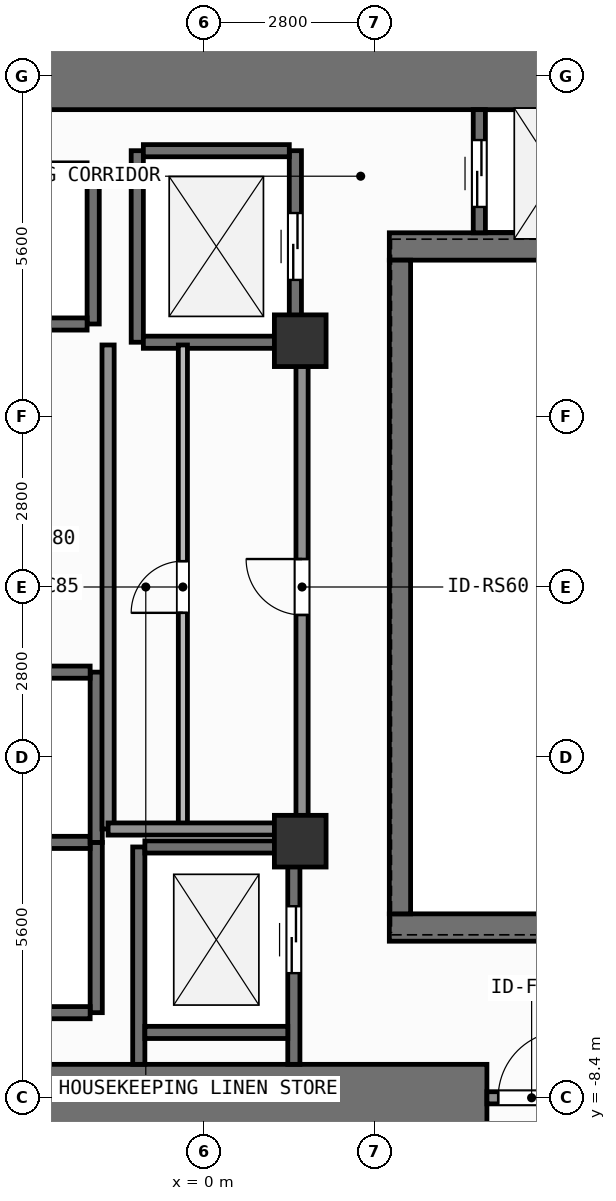
"""IFC4 building model, lengths in metres.
Left out: names, types, materials, properties, quantities, classifications, styles, units other than length and angle.
Written with IfcOpenShell. Run it as: python <this file> out.ifc"""

import sys

from ifc_helpers import new_model, si_unit, direction, frame, frame_2d, origin, origin_2d, place, context, subcontext, project, spatial, rectangle, extrude, element, fill, save


model = new_model("IFC4")
c1 = context("Model", 3, precision=1e-05, world=origin(), true_north=direction((0.0, 1.0)))
c2 = subcontext(c1, "Body", "Model", "MODEL_VIEW")
j1 = project(units=[si_unit("LENGTHUNIT", "METRE"), si_unit("PLANEANGLEUNIT", "RADIAN")], contexts=[c1])
p1 = place(None, origin())
s1 = spatial("IfcSite", under=j1, at=p1, CompositionType="ELEMENT")
p2 = place(p1, origin())
s2 = spatial("IfcBuilding", under=s1, at=p2, CompositionType="ELEMENT")
p3 = place(p2, frame((0.0, 0.0, 54.0)))
s3 = spatial("IfcBuildingStorey", under=s2, at=p3, CompositionType="ELEMENT", Elevation=54.0)
p4 = place(p3, frame((-2.62, -8.4, 0.0), z_axis=(0.0, 0.0, 1.0), x_axis=(1.0, 0.0, 0.0)))
e1 = element("IfcWall", 1, at=p4, inside=s3, PredefinedType="SHEAR", context=c2, shape_type="SweptSolid", body=[
    extrude(rectangle(XDim=7.27, YDim=1.1, at=frame_2d((3.635, 0.0))), origin(), (0.0, 0.0, 1.0), 3.9),
])
p5 = place(p3, frame((-7.55, 8.4, 0.0), z_axis=(0.0, 0.0, 1.0), x_axis=(1.0, 0.0, 0.0)))
e2 = element("IfcWall", 2, at=p5, inside=s3, PredefinedType="SHEAR", context=c2, shape_type="SweptSolid", body=[
    extrude(rectangle(XDim=16.5, YDim=1.1, at=frame_2d((8.25, 0.0))), origin(), (0.0, 0.0, 1.0), 3.9),
])
for number, where, z_axis, x_axis in (
    (3, (3.045, -5.6, 0.0), (0.0, 0.0, 1.0), (1.0, 0.0, 0.0)),
    (4, (3.045, 5.6, 0.0), (0.0, 0.0, 1.0), (1.0, 0.0, 0.0)),
):
    element("IfcWall", number, at=place(p3, frame(where, z_axis=z_axis, x_axis=x_axis)), inside=s3, PredefinedType="SHEAR", context=c2, shape_type="SweptSolid", body=[
        extrude(rectangle(XDim=5.905, YDim=0.45, at=frame_2d((2.953, 0.0))), origin(), (0.0, 0.0, 1.0), 3.9),
    ])
p6 = place(p3, frame((3.22, -5.375, 0.0), z_axis=(0.0, 0.0, 1.0), x_axis=(0.0, 1.0, 0.0)))
e5 = element("IfcWall", 5, at=p6, inside=s3, PredefinedType="SHEAR", context=c2, shape_type="SweptSolid", body=[
    extrude(rectangle(XDim=10.75, YDim=0.35, at=frame_2d((5.375, 0.0))), origin(), (0.0, 0.0, 1.0), 3.9),
])
for number, where, z_axis, x_axis in (
    (6, (1.58, -4.18, 0.0), (0.0, 0.0, 1.0), (1.0, 0.0, 0.0)),
    (7, (1.58, 4.05, 0.0), (0.0, 0.0, 1.0), (1.0, 0.0, 0.0)),
):
    element("IfcColumn", number, at=place(p3, frame(where, z_axis=z_axis, x_axis=x_axis)), inside=s3, PredefinedType="COLUMN", context=c2, shape_type="SweptSolid", body=[
        extrude(rectangle(XDim=0.85, YDim=0.85, at=origin_2d()), origin(), (0.0, 0.0, 1.0), 3.9),
    ])
p7 = place(p3, frame((-1.825, 4.325, 0.0), z_axis=(0.0, 0.0, 1.0), x_axis=(0.0, 1.0, 0.0)))
e8 = element("IfcWall", 8, at=p7, inside=s3, PredefinedType="SHEAR", context=c2, shape_type="SweptSolid", body=[
    extrude(rectangle(XDim=2.55, YDim=0.2, at=frame_2d((1.275, 0.0))), origin(), (0.0, 0.0, 1.0), 3.68),
])
for number, where, z_axis, x_axis in (
    (9, (-4.275, 4.325, 0.0), (0.0, 0.0, 1.0), (1.0, 0.0, 0.0)),
    (10, (-4.275, 6.875, 0.0), (0.0, 0.0, 1.0), (1.0, 0.0, 0.0)),
):
    element("IfcWall", number, at=place(p3, frame(where, z_axis=z_axis, x_axis=x_axis)), inside=s3, PredefinedType="SHEAR", context=c2, shape_type="SweptSolid", body=[
        extrude(rectangle(XDim=2.35, YDim=0.2, at=frame_2d((1.175, 0.0))), origin(), (0.0, 0.0, 1.0), 3.68),
    ])
p8 = place(p3, frame((-1.775, -7.0, 0.0), z_axis=(0.0, 0.0, 1.0), x_axis=(0.0, 1.0, 0.0)))
e11 = element("IfcWall", 11, at=p8, inside=s3, PredefinedType="SHEAR", context=c2, shape_type="SweptSolid", body=[
    extrude(rectangle(XDim=2.8, YDim=0.2, at=frame_2d((1.4, 0.0))), origin(), (0.0, 0.0, 1.0), 3.68),
])
for number, where, z_axis, x_axis in (
    (12, (-4.325, -7.0, 0.0), (0.0, 0.0, 1.0), (1.0, 0.0, 0.0)),
    (13, (-4.325, -4.2, 0.0), (0.0, 0.0, 1.0), (1.0, 0.0, 0.0)),
):
    element("IfcWall", number, at=place(p3, frame(where, z_axis=z_axis, x_axis=x_axis)), inside=s3, PredefinedType="SHEAR", context=c2, shape_type="SweptSolid", body=[
        extrude(rectangle(XDim=2.45, YDim=0.2, at=frame_2d((1.225, 0.0))), origin(), (0.0, 0.0, 1.0), 3.68),
    ])
p9 = place(p3, frame((-1.775, -4.2, 0.0), z_axis=(0.0, 0.0, 1.0), x_axis=(0.0, 1.0, 0.0)))
e14 = element("IfcWall", 14, at=p9, inside=s3, PredefinedType="SHEAR", context=c2, shape_type="SweptSolid", body=[
    extrude(rectangle(XDim=2.8, YDim=0.2, at=frame_2d((1.4, 0.0))), origin(), (0.0, 0.0, 1.0), 3.68),
])
p10 = place(p3, frame((-4.325, -1.4, 0.0), z_axis=(0.0, 0.0, 1.0), x_axis=(1.0, 0.0, 0.0)))
e15 = element("IfcWall", 15, at=p10, inside=s3, PredefinedType="SHEAR", context=c2, shape_type="SweptSolid", body=[
    extrude(rectangle(XDim=2.45, YDim=0.2, at=frame_2d((1.225, 0.0))), origin(), (0.0, 0.0, 1.0), 3.68),
])
p11 = place(p3, frame((-1.1, 4.025, 0.0), z_axis=(0.0, 0.0, 1.0), x_axis=(0.0, 1.0, 0.0)))
e16 = element("IfcWall", 16, at=p11, inside=s3, PredefinedType="SHEAR", context=c2, shape_type="SweptSolid", body=[
    extrude(rectangle(XDim=3.15, YDim=0.2, at=frame_2d((1.575, 0.0))), origin(), (0.0, 0.0, 1.0), 3.68),
])
p12 = place(p3, frame((1.5, 4.025, 0.0), z_axis=(0.0, 0.0, 1.0), x_axis=(0.0, 1.0, 0.0)))
e17 = element("IfcWall", 17, at=p12, inside=s3, PredefinedType="SHEAR", context=c2, shape_type="SweptSolid", body=[
    extrude(rectangle(XDim=3.15, YDim=0.2, at=frame_2d((1.575, 0.0))), origin(), (0.0, 0.0, 1.0), 3.68),
])
p13 = place(p12, frame((1.025, 0.0, 0.0)))
e18 = element("IfcOpeningElement", 18, at=p13, cuts=e17, PredefinedType="OPENING", context=c2, shape_type="SweptSolid", body=[
    extrude(rectangle(XDim=1.1, YDim=2.2, at=frame_2d((0.55, 1.1))), frame((0.0, 0.11, 0.0), z_axis=(0.0, -1.0, 0.0), x_axis=(1.0, 0.0, 0.0)), (0.0, 0.0, 1.0), 0.22),
])
for number, where, z_axis, x_axis in (
    (19, (-1.0, 4.025, 0.0), (0.0, 0.0, 1.0), (1.0, 0.0, 0.0)),
    (20, (-1.0, 7.175, 0.0), (0.0, 0.0, 1.0), (1.0, 0.0, 0.0)),
):
    element("IfcWall", number, at=place(p3, frame(where, z_axis=z_axis, x_axis=x_axis)), inside=s3, PredefinedType="SHEAR", context=c2, shape_type="SweptSolid", body=[
        extrude(rectangle(XDim=2.4, YDim=0.2, at=frame_2d((1.2, 0.0))), origin(), (0.0, 0.0, 1.0), 3.68),
    ])
p14 = place(p3, frame((-1.075, -7.85, 0.0), z_axis=(0.0, 0.0, 1.0), x_axis=(0.0, 1.0, 0.0)))
e21 = element("IfcWall", 21, at=p14, inside=s3, PredefinedType="SHEAR", context=c2, shape_type="SweptSolid", body=[
    extrude(rectangle(XDim=3.575, YDim=0.2, at=frame_2d((1.788, 0.0))), origin(), (0.0, 0.0, 1.0), 3.68),
])
p15 = place(p3, frame((1.475, -7.85, 0.0), z_axis=(0.0, 0.0, 1.0), x_axis=(0.0, 1.0, 0.0)))
e22 = element("IfcWall", 22, at=p15, inside=s3, PredefinedType="SHEAR", context=c2, shape_type="SweptSolid", body=[
    extrude(rectangle(XDim=3.575, YDim=0.2, at=frame_2d((1.788, 0.0))), origin(), (0.0, 0.0, 1.0), 3.68),
])
p16 = place(p15, frame((1.5, 0.0, 0.0)))
e23 = element("IfcOpeningElement", 23, at=p16, cuts=e22, PredefinedType="OPENING", context=c2, shape_type="SweptSolid", body=[
    extrude(rectangle(XDim=1.1, YDim=2.2, at=frame_2d((0.55, 1.1))), frame((0.0, 0.11, 0.0), z_axis=(0.0, -1.0, 0.0), x_axis=(1.0, 0.0, 0.0)), (0.0, 0.0, 1.0), 0.22),
])
for number, where, z_axis, x_axis in (
    (24, (-0.975, -7.325, 0.0), (0.0, 0.0, 1.0), (1.0, 0.0, 0.0)),
    (25, (-0.975, -4.275, 0.0), (0.0, 0.0, 1.0), (1.0, 0.0, 0.0)),
):
    element("IfcWall", number, at=place(p3, frame(where, z_axis=z_axis, x_axis=x_axis)), inside=s3, PredefinedType="SHEAR", context=c2, shape_type="SweptSolid", body=[
        extrude(rectangle(XDim=2.35, YDim=0.2, at=frame_2d((1.175, 0.0))), origin(), (0.0, 0.0, 1.0), 3.68),
    ])
p17 = place(p3, frame((4.525, 5.825, 0.0), z_axis=(0.0, 0.0, 1.0), x_axis=(0.0, 1.0, 0.0)))
e26 = element("IfcWall", 26, at=p17, inside=s3, PredefinedType="SHEAR", context=c2, shape_type="SweptSolid", body=[
    extrude(rectangle(XDim=2.025, YDim=0.2, at=frame_2d((1.013, 0.0))), origin(), (0.0, 0.0, 1.0), 3.68),
])
p18 = place(p17, frame((0.425, 0.0, 0.0)))
e27 = element("IfcOpeningElement", 27, at=p18, cuts=e26, PredefinedType="OPENING", context=c2, shape_type="SweptSolid", body=[
    extrude(rectangle(XDim=1.1, YDim=2.2, at=frame_2d((0.55, 1.1))), frame((0.0, 0.11, 0.0), z_axis=(0.0, -1.0, 0.0), x_axis=(1.0, 0.0, 0.0)), (0.0, 0.0, 1.0), 0.22),
])
p19 = place(p3, frame((4.65, -8.4, 0.0), z_axis=(0.0, 0.0, 1.0), x_axis=(1.0, 0.0, 0.0)))
e28 = element("IfcWall", 28, at=p19, inside=s3, PredefinedType="SOLIDWALL", context=c2, shape_type="SweptSolid", body=[
    extrude(rectangle(XDim=1.47, YDim=0.2, at=frame_2d((0.735, 0.0))), origin(), (0.0, 0.0, 1.0), 2.72),
])
p20 = place(p19, frame((0.185, 0.0, 0.0)))
e29 = element("IfcOpeningElement", 29, at=p20, cuts=e28, PredefinedType="OPENING", context=c2, shape_type="SweptSolid", body=[
    extrude(rectangle(XDim=1.1, YDim=2.15, at=frame_2d((0.55, 1.075))), frame((0.0, 0.11, 0.0), z_axis=(0.0, -1.0, 0.0), x_axis=(1.0, 0.0, 0.0)), (0.0, 0.0, 1.0), 0.22),
])
p21 = place(p3, frame((-0.35, -3.98, 0.0), z_axis=(0.0, 0.0, 1.0), x_axis=(0.0, 1.0, 0.0)))
e30 = element("IfcWall", 30, at=p21, inside=s3, PredefinedType="PARTITIONING", context=c2, shape_type="SweptSolid", body=[
    extrude(rectangle(XDim=7.96, YDim=0.15, at=frame_2d((3.98, 0.0))), origin(), (0.0, 0.0, 1.0), 3.68),
])
p22 = place(p21, frame((3.555, 0.0, 0.0)))
e31 = element("IfcOpeningElement", 31, at=p22, cuts=e30, PredefinedType="OPENING", context=c2, shape_type="SweptSolid", body=[
    extrude(rectangle(XDim=0.85, YDim=2.1, at=frame_2d((0.425, 1.05))), frame((0.0, 0.085, 0.0), z_axis=(0.0, -1.0, 0.0), x_axis=(1.0, 0.0, 0.0)), (0.0, 0.0, 1.0), 0.17),
])
p23 = place(p3, frame((1.61, -3.98, 0.0), z_axis=(0.0, 0.0, 1.0), x_axis=(0.0, 1.0, 0.0)))
e32 = element("IfcWall", 32, at=p23, inside=s3, PredefinedType="SOLIDWALL", context=c2, shape_type="SweptSolid", body=[
    extrude(rectangle(XDim=7.96, YDim=0.2, at=frame_2d((3.98, 0.0))), origin(), (0.0, 0.0, 1.0), 3.68),
])
p24 = place(p23, frame((3.52, 0.0, 0.0)))
e33 = element("IfcOpeningElement", 33, at=p24, cuts=e32, PredefinedType="OPENING", context=c2, shape_type="SweptSolid", body=[
    extrude(rectangle(XDim=0.92, YDim=2.1, at=frame_2d((0.46, 1.05))), frame((0.0, 0.11, 0.0), z_axis=(0.0, -1.0, 0.0), x_axis=(1.0, 0.0, 0.0)), (0.0, 0.0, 1.0), 0.22),
])
p25 = place(p3, frame((-1.58, -3.98, 0.0), z_axis=(0.0, 0.0, 1.0), x_axis=(0.0, 1.0, 0.0)))
e34 = element("IfcWall", 34, at=p25, inside=s3, PredefinedType="SOLIDWALL", context=c2, shape_type="SweptSolid", body=[
    extrude(rectangle(XDim=7.96, YDim=0.2, at=frame_2d((3.98, 0.0))), origin(), (0.0, 0.0, 1.0), 3.68),
])
p26 = place(p3, frame((-1.58, -3.98, 0.0), z_axis=(0.0, 0.0, 1.0), x_axis=(1.0, 0.0, 0.0)))
e35 = element("IfcWall", 35, at=p26, inside=s3, PredefinedType="SOLIDWALL", context=c2, shape_type="SweptSolid", body=[
    extrude(rectangle(XDim=3.19, YDim=0.2, at=frame_2d((1.595, 0.0))), origin(), (0.0, 0.0, 1.0), 3.68),
])
p27 = place(p13, origin())
e36 = element("IfcDoor", 36, at=p27, inside=s3, OperationType="SLIDING_TO_LEFT", PredefinedType="DOOR", context=c2, shape_type="SweptSolid", body=[
    extrude(rectangle(XDim=1.1, YDim=2.2, at=frame_2d((0.55, 1.1))), frame((0.0, 0.025, 0.0), z_axis=(0.0, -1.0, 0.0), x_axis=(1.0, 0.0, 0.0)), (0.0, 0.0, 1.0), 0.05),
])
fill(e18, e36)
p28 = place(p16, origin())
e37 = element("IfcDoor", 37, at=p28, inside=s3, OperationType="SLIDING_TO_LEFT", PredefinedType="DOOR", context=c2, shape_type="SweptSolid", body=[
    extrude(rectangle(XDim=1.1, YDim=2.2, at=frame_2d((0.55, 1.1))), frame((0.0, 0.025, 0.0), z_axis=(0.0, -1.0, 0.0), x_axis=(1.0, 0.0, 0.0)), (0.0, 0.0, 1.0), 0.05),
])
fill(e23, e37)
p29 = place(p18, origin())
e38 = element("IfcDoor", 38, at=p29, inside=s3, OperationType="SLIDING_TO_LEFT", PredefinedType="DOOR", context=c2, shape_type="SweptSolid", body=[
    extrude(rectangle(XDim=1.1, YDim=2.2, at=frame_2d((0.55, 1.1))), frame((0.0, 0.025, 0.0), z_axis=(0.0, -1.0, 0.0), x_axis=(1.0, 0.0, 0.0)), (0.0, 0.0, 1.0), 0.05),
])
fill(e27, e38)
p30 = place(p20, origin())
e39 = element("IfcDoor", 39, at=p30, inside=s3, OperationType="SINGLE_SWING_RIGHT", PredefinedType="DOOR", context=c2, shape_type="SweptSolid", body=[
    extrude(rectangle(XDim=1.1, YDim=2.15, at=frame_2d((0.55, 1.075))), frame((0.0, 0.025, 0.0), z_axis=(0.0, -1.0, 0.0), x_axis=(1.0, 0.0, 0.0)), (0.0, 0.0, 1.0), 0.05),
])
fill(e29, e39)
p31 = place(p22, origin())
e40 = element("IfcDoor", 40, at=p31, inside=s3, OperationType="SINGLE_SWING_LEFT", PredefinedType="DOOR", context=c2, shape_type="SweptSolid", body=[
    extrude(rectangle(XDim=0.85, YDim=2.1, at=frame_2d((0.425, 1.05))), frame((0.0, 0.025, 0.0), z_axis=(0.0, -1.0, 0.0), x_axis=(1.0, 0.0, 0.0)), (0.0, 0.0, 1.0), 0.05),
])
fill(e31, e40)
p32 = place(p24, origin())
e41 = element("IfcDoor", 41, at=p32, inside=s3, OperationType="SINGLE_SWING_RIGHT", PredefinedType="DOOR", context=c2, shape_type="SweptSolid", body=[
    extrude(rectangle(XDim=0.92, YDim=2.1, at=frame_2d((0.46, 1.05))), frame((0.0, 0.025, 0.0), z_axis=(0.0, -1.0, 0.0), x_axis=(1.0, 0.0, 0.0)), (0.0, 0.0, 1.0), 0.05),
])
fill(e33, e41)
save(model, sys.argv[1])
